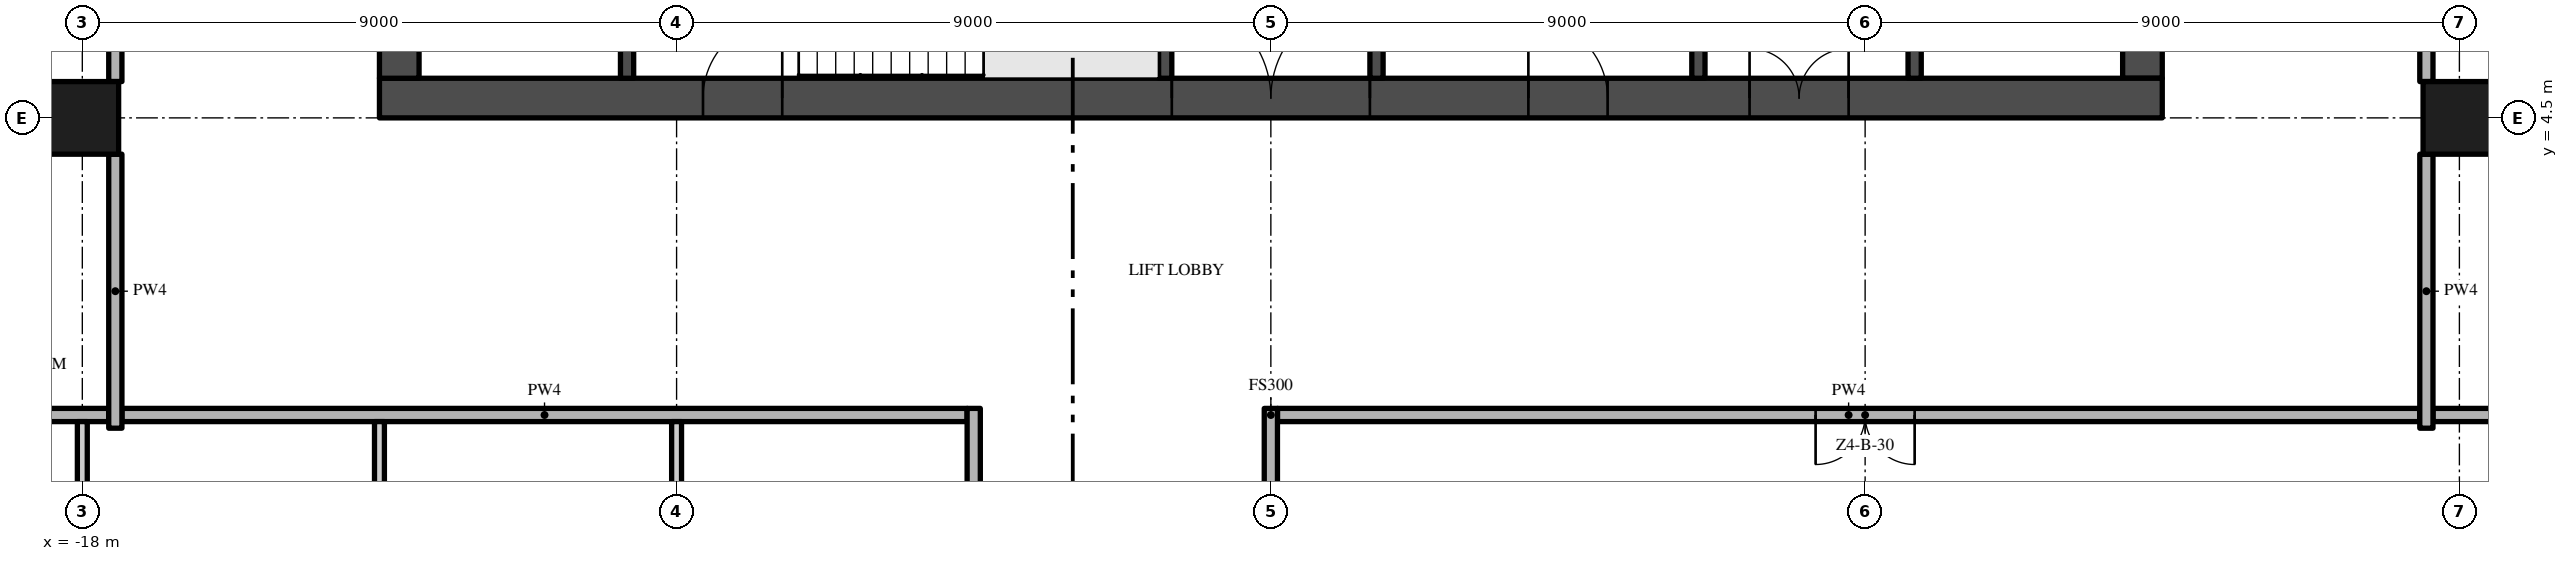
"""IFC4 building model, lengths in metres.
Left out: names, types, materials, properties, quantities, classifications, styles, units other than length and angle.
Written with IfcOpenShell. Run it as: python <this file> out.ifc"""

import sys

from ifc_helpers import new_model, si_unit, direction, frame, frame_2d, origin, origin_2d, place, context, subcontext, project, spatial, rectangle, extrude, element, fill, save


model = new_model("IFC4")
c1 = context("Model", 3, precision=1e-05, world=origin(), true_north=direction((0.0, 1.0)))
c2 = subcontext(c1, "Body", "Model", "MODEL_VIEW")
j1 = project(units=[si_unit("LENGTHUNIT", "METRE"), si_unit("PLANEANGLEUNIT", "RADIAN")], contexts=[c1])
p1 = place(None, origin())
s1 = spatial("IfcSite", under=j1, at=p1, CompositionType="ELEMENT")
p2 = place(p1, origin())
s2 = spatial("IfcBuilding", under=s1, at=p2, CompositionType="ELEMENT")
p3 = place(p2, frame((0.0, 0.0, 199.6)))
s3 = spatial("IfcBuildingStorey", under=s2, at=p3, CompositionType="ELEMENT", Elevation=199.6)
p4 = place(p3, frame((-13.5, 4.8, -0.3), z_axis=(0.0, 0.0, 1.0), x_axis=(1.0, 0.0, 0.0)))
e1 = element("IfcWall", 1, at=p4, inside=s3, PredefinedType="SHEAR", context=c2, shape_type="SweptSolid", body=[
    extrude(rectangle(XDim=27.0, YDim=0.6, at=frame_2d((13.5, 0.0))), origin(), (0.0, 0.0, 1.0), 3.8),
])
p5 = place(p4, frame((12.0, 0.0, 0.3)))
e2 = element("IfcOpeningElement", 2, at=p5, cuts=e1, PredefinedType="OPENING", context=c2, shape_type="SweptSolid", body=[
    extrude(rectangle(XDim=3.0, YDim=2.4, at=frame_2d((1.5, 1.2))), frame((0.0, 0.31, 0.0), z_axis=(0.0, -1.0, 0.0), x_axis=(1.0, 0.0, 0.0)), (0.0, 0.0, 1.0), 0.62),
])
p6 = place(p4, frame((4.9, 0.0, 0.3)))
e3 = element("IfcOpeningElement", 3, at=p6, cuts=e1, PredefinedType="OPENING", context=c2, shape_type="SweptSolid", body=[
    extrude(rectangle(XDim=1.2, YDim=2.2, at=frame_2d((0.6, 1.1))), frame((0.0, 0.31, 0.0), z_axis=(0.0, -1.0, 0.0), x_axis=(1.0, 0.0, 0.0)), (0.0, 0.0, 1.0), 0.62),
])
p7 = place(p4, frame((20.75, 0.0, 0.3)))
e4 = element("IfcOpeningElement", 4, at=p7, cuts=e1, PredefinedType="OPENING", context=c2, shape_type="SweptSolid", body=[
    extrude(rectangle(XDim=1.5, YDim=2.2, at=frame_2d((0.75, 1.1))), frame((0.0, 0.31, 0.0), z_axis=(0.0, -1.0, 0.0), x_axis=(1.0, 0.0, 0.0)), (0.0, 0.0, 1.0), 0.62),
])
p8 = place(p4, frame((17.4, 0.0, 0.3)))
e5 = element("IfcOpeningElement", 5, at=p8, cuts=e1, PredefinedType="OPENING", context=c2, shape_type="SweptSolid", body=[
    extrude(rectangle(XDim=1.2, YDim=2.2, at=frame_2d((0.6, 1.1))), frame((0.0, 0.31, 0.0), z_axis=(0.0, -1.0, 0.0), x_axis=(1.0, 0.0, 0.0)), (0.0, 0.0, 1.0), 0.62),
])
p9 = place(p3, frame((13.2, 5.1, -0.3), z_axis=(0.0, 0.0, 1.0), x_axis=(0.0, 1.0, 0.0)))
e6 = element("IfcWall", 6, at=p9, inside=s3, PredefinedType="SHEAR", context=c2, shape_type="SweptSolid", body=[
    extrude(rectangle(XDim=16.8, YDim=0.6, at=frame_2d((8.4, 0.0))), origin(), (0.0, 0.0, 1.0), 3.8),
])
p10 = place(p9, frame((6.3, 0.0, 0.3)))
e7 = element("IfcOpeningElement", 7, at=p10, cuts=e6, PredefinedType="OPENING", context=c2, shape_type="SweptSolid", body=[
    extrude(rectangle(XDim=1.2, YDim=2.2, at=frame_2d((0.6, 1.1))), frame((0.0, 0.31, 0.0), z_axis=(0.0, -1.0, 0.0), x_axis=(1.0, 0.0, 0.0)), (0.0, 0.0, 1.0), 0.62),
])
p11 = place(p3, frame((-13.2, 21.9, -0.3), z_axis=(0.0, 0.0, 1.0), x_axis=(0.0, -1.0, 0.0)))
e8 = element("IfcWall", 8, at=p11, inside=s3, PredefinedType="SHEAR", context=c2, shape_type="SweptSolid", body=[
    extrude(rectangle(XDim=16.8, YDim=0.6, at=frame_2d((8.4, 0.0))), origin(), (0.0, 0.0, 1.0), 3.8),
])
p12 = place(p11, frame((9.3, 0.0, 0.3)))
e9 = element("IfcOpeningElement", 9, at=p12, cuts=e8, PredefinedType="OPENING", context=c2, shape_type="SweptSolid", body=[
    extrude(rectangle(XDim=1.2, YDim=2.2, at=frame_2d((0.6, 1.1))), frame((0.0, 0.31, 0.0), z_axis=(0.0, -1.0, 0.0), x_axis=(1.0, 0.0, 0.0)), (0.0, 0.0, 1.0), 0.62),
])
for number, where, z_axis, x_axis in (
    (10, (-18.0, 4.5, 0.0), (0.0, 0.0, 1.0), (1.0, 0.0, 0.0)),
    (11, (18.0, 4.5, 0.0), (0.0, 0.0, 1.0), (1.0, 0.0, 0.0)),
):
    element("IfcColumn", number, at=place(p3, frame(where, z_axis=z_axis, x_axis=x_axis)), inside=s3, PredefinedType="COLUMN", context=c2, shape_type="SweptSolid", body=[
        extrude(rectangle(XDim=1.1, YDim=1.1, at=origin_2d()), origin(), (0.0, 0.0, 1.0), 3.5),
    ])
for number, where, z_axis, x_axis in (
    (12, (-9.75, 5.1, 0.0), (0.0, 0.0, 1.0), (0.0, 1.0, 0.0)),
    (13, (-1.6, 5.1, 0.0), (0.0, 0.0, 1.0), (0.0, 1.0, 0.0)),
):
    element("IfcWall", number, at=place(p3, frame(where, z_axis=z_axis, x_axis=x_axis)), inside=s3, PredefinedType="SHEAR", context=c2, shape_type="SweptSolid", body=[
        extrude(rectangle(XDim=2.85, YDim=0.2, at=frame_2d((1.425, 0.0))), origin(), (0.0, 0.0, 1.0), 3.5),
    ])
p13 = place(p3, frame((1.6, 11.5, 0.0), z_axis=(0.0, 0.0, 1.0), x_axis=(0.0, -1.0, 0.0)))
e14 = element("IfcWall", 14, at=p13, inside=s3, PredefinedType="SHEAR", context=c2, shape_type="SweptSolid", body=[
    extrude(rectangle(XDim=6.4, YDim=0.2, at=frame_2d((3.2, 0.0))), origin(), (0.0, 0.0, 1.0), 3.5),
])
p14 = place(p13, frame((2.35, 0.0, 0.0)))
e15 = element("IfcOpeningElement", 15, at=p14, cuts=e14, PredefinedType="OPENING", context=c2, shape_type="SweptSolid", body=[
    extrude(rectangle(XDim=0.9, YDim=2.1, at=frame_2d((0.45, 1.05))), frame((0.0, 0.11, 0.0), z_axis=(0.0, -1.0, 0.0), x_axis=(1.0, 0.0, 0.0)), (0.0, 0.0, 1.0), 0.22),
])
p15 = place(p3, frame((6.475, 5.1, 0.0), z_axis=(0.0, 0.0, 1.0), x_axis=(0.0, 1.0, 0.0)))
e16 = element("IfcWall", 16, at=p15, inside=s3, PredefinedType="SHEAR", context=c2, shape_type="SweptSolid", body=[
    extrude(rectangle(XDim=6.4, YDim=0.2, at=frame_2d((3.2, 0.0))), origin(), (0.0, 0.0, 1.0), 3.5),
])
p16 = place(p3, frame((9.75, 5.1, 0.0), z_axis=(0.0, 0.0, 1.0), x_axis=(0.0, 1.0, 0.0)))
e17 = element("IfcWall", 17, at=p16, inside=s3, PredefinedType="SHEAR", context=c2, shape_type="SweptSolid", body=[
    extrude(rectangle(XDim=2.5, YDim=0.2, at=frame_2d((1.25, 0.0))), origin(), (0.0, 0.0, 1.0), 3.5),
])
p17 = place(p16, frame((0.85, 0.0, 0.0)))
e18 = element("IfcOpeningElement", 18, at=p17, cuts=e17, PredefinedType="OPENING", context=c2, shape_type="SweptSolid", body=[
    extrude(rectangle(XDim=1.1, YDim=2.1, at=frame_2d((0.55, 1.05))), frame((0.0, 0.11, 0.0), z_axis=(0.0, -1.0, 0.0), x_axis=(1.0, 0.0, 0.0)), (0.0, 0.0, 1.0), 0.22),
])
p18 = place(p3, frame((-17.4, 0.0, 0.0), z_axis=(0.0, 0.0, 1.0), x_axis=(1.0, 0.0, 0.0)))
e19 = element("IfcWall", 19, at=p18, inside=s3, PredefinedType="PARTITIONING", context=c2, shape_type="SweptSolid", body=[
    extrude(rectangle(XDim=12.8, YDim=0.2, at=frame_2d((6.4, 0.0))), origin(), (0.0, 0.0, 1.0), 3.5),
])
p19 = place(p3, frame((17.4, 0.0, 0.0), z_axis=(0.0, 0.0, 1.0), x_axis=(-1.0, 0.0, 0.0)))
e20 = element("IfcWall", 20, at=p19, inside=s3, PredefinedType="PARTITIONING", context=c2, shape_type="SweptSolid", body=[
    extrude(rectangle(XDim=17.3, YDim=0.2, at=frame_2d((8.65, 0.0))), origin(), (0.0, 0.0, 1.0), 3.5),
])
p20 = place(p19, frame((7.65, 0.0, 0.0)))
e21 = element("IfcOpeningElement", 21, at=p20, cuts=e20, PredefinedType="OPENING", context=c2, shape_type="SweptSolid", body=[
    extrude(rectangle(XDim=1.5, YDim=2.4, at=frame_2d((0.75, 1.2))), frame((0.0, 0.11, 0.0), z_axis=(0.0, -1.0, 0.0), x_axis=(1.0, 0.0, 0.0)), (0.0, 0.0, 1.0), 0.22),
])
for number, where, z_axis, x_axis in (
    (22, (-26.7, 0.0, 0.0), (0.0, 0.0, 1.0), (1.0, 0.0, 0.0)),
    (23, (17.6, 0.0, 0.0), (0.0, 0.0, 1.0), (1.0, 0.0, 0.0)),
):
    element("IfcWall", number, at=place(p3, frame(where, z_axis=z_axis, x_axis=x_axis)), inside=s3, PredefinedType="PARTITIONING", context=c2, shape_type="SweptSolid", body=[
        extrude(rectangle(XDim=9.1, YDim=0.2, at=frame_2d((4.55, 0.0))), origin(), (0.0, 0.0, 1.0), 3.5),
    ])
p21 = place(p3, frame((-18.0, -3.95, 0.0), z_axis=(0.0, 0.0, 1.0), x_axis=(0.0, 1.0, 0.0)))
e24 = element("IfcWall", 24, at=p21, inside=s3, PredefinedType="PARTITIONING", context=c2, shape_type="SweptSolid", body=[
    extrude(rectangle(XDim=3.85, YDim=0.15, at=frame_2d((1.925, 0.0))), origin(), (0.0, 0.0, 1.0), 3.5),
])
p22 = place(p21, frame((0.15, 0.0, 0.0)))
e25 = element("IfcOpeningElement", 25, at=p22, cuts=e24, PredefinedType="OPENING", context=c2, shape_type="SweptSolid", body=[
    extrude(rectangle(XDim=1.0, YDim=2.4, at=frame_2d((0.5, 1.2))), frame((0.0, 0.085, 0.0), z_axis=(0.0, -1.0, 0.0), x_axis=(1.0, 0.0, 0.0)), (0.0, 0.0, 1.0), 0.17),
])
p23 = place(p3, frame((-17.5, -0.2, 0.0), z_axis=(0.0, 0.0, 1.0), x_axis=(0.0, 1.0, 0.0)))
e26 = element("IfcWall", 26, at=p23, inside=s3, PredefinedType="PARTITIONING", context=c2, shape_type="SweptSolid", body=[
    extrude(rectangle(XDim=4.15, YDim=0.2, at=frame_2d((2.075, 0.0))), origin(), (0.0, 0.0, 1.0), 3.5),
])
p24 = place(p3, frame((-17.5, 5.05, 0.0), z_axis=(0.0, 0.0, 1.0), x_axis=(0.0, 1.0, 0.0)))
e27 = element("IfcWall", 27, at=p24, inside=s3, PredefinedType="PARTITIONING", context=c2, shape_type="SweptSolid", body=[
    extrude(rectangle(XDim=7.9, YDim=0.2, at=frame_2d((3.95, 0.0))), origin(), (0.0, 0.0, 1.0), 3.5),
])
p25 = place(p24, frame((3.35, 0.0, 0.0)))
e28 = element("IfcOpeningElement", 28, at=p25, cuts=e27, PredefinedType="OPENING", context=c2, shape_type="SweptSolid", body=[
    extrude(rectangle(XDim=1.2, YDim=2.4, at=frame_2d((0.6, 1.2))), frame((0.0, 0.11, 0.0), z_axis=(0.0, -1.0, 0.0), x_axis=(1.0, 0.0, 0.0)), (0.0, 0.0, 1.0), 0.22),
])
p26 = place(p3, frame((-13.5, -8.325, 0.0), z_axis=(0.0, 0.0, 1.0), x_axis=(0.0, 1.0, 0.0)))
e29 = element("IfcWall", 29, at=p26, inside=s3, PredefinedType="PARTITIONING", context=c2, shape_type="SweptSolid", body=[
    extrude(rectangle(XDim=8.225, YDim=0.15, at=frame_2d((4.112, 0.0))), origin(), (0.0, 0.0, 1.0), 3.5),
])
p27 = place(p3, frame((-9.0, -3.95, 0.0), z_axis=(0.0, 0.0, 1.0), x_axis=(0.0, 1.0, 0.0)))
e30 = element("IfcWall", 30, at=p27, inside=s3, PredefinedType="PARTITIONING", context=c2, shape_type="SweptSolid", body=[
    extrude(rectangle(XDim=3.85, YDim=0.15, at=frame_2d((1.925, 0.0))), origin(), (0.0, 0.0, 1.0), 3.5),
])
p28 = place(p27, frame((0.45, 0.0, 0.0)))
e31 = element("IfcOpeningElement", 31, at=p28, cuts=e30, PredefinedType="OPENING", context=c2, shape_type="SweptSolid", body=[
    extrude(rectangle(XDim=1.0, YDim=2.4, at=frame_2d((0.5, 1.2))), frame((0.0, 0.085, 0.0), z_axis=(0.0, -1.0, 0.0), x_axis=(1.0, 0.0, 0.0)), (0.0, 0.0, 1.0), 0.17),
])
p29 = place(p3, frame((-4.5, -22.2, 0.0), z_axis=(0.0, 0.0, 1.0), x_axis=(0.0, 1.0, 0.0)))
e32 = element("IfcWall", 32, at=p29, inside=s3, PredefinedType="PARTITIONING", context=c2, shape_type="SweptSolid", body=[
    extrude(rectangle(XDim=22.3, YDim=0.2, at=frame_2d((11.15, 0.0))), origin(), (0.0, 0.0, 1.0), 3.5),
])
p30 = place(p29, frame((10.2, 0.0, 0.0)))
e33 = element("IfcOpeningElement", 33, at=p30, cuts=e32, PredefinedType="OPENING", context=c2, shape_type="SweptSolid", body=[
    extrude(rectangle(XDim=1.5, YDim=2.4, at=frame_2d((0.75, 1.2))), frame((0.0, 0.11, 0.0), z_axis=(0.0, -1.0, 0.0), x_axis=(1.0, 0.0, 0.0)), (0.0, 0.0, 1.0), 0.22),
])
p31 = place(p3, frame((0.0, -3.95, 0.0), z_axis=(0.0, 0.0, 1.0), x_axis=(0.0, 1.0, 0.0)))
e34 = element("IfcWall", 34, at=p31, inside=s3, PredefinedType="PARTITIONING", context=c2, shape_type="SweptSolid", body=[
    extrude(rectangle(XDim=4.05, YDim=0.2, at=frame_2d((2.025, 0.0))), origin(), (0.0, 0.0, 1.0), 3.5),
])
p32 = place(p3, frame((17.5, -0.2, 0.0), z_axis=(0.0, 0.0, 1.0), x_axis=(0.0, 1.0, 0.0)))
e35 = element("IfcWall", 35, at=p32, inside=s3, PredefinedType="PARTITIONING", context=c2, shape_type="SweptSolid", body=[
    extrude(rectangle(XDim=4.15, YDim=0.2, at=frame_2d((2.075, 0.0))), origin(), (0.0, 0.0, 1.0), 3.5),
])
p33 = place(p3, frame((17.5, 12.95, 0.0), z_axis=(0.0, 0.0, 1.0), x_axis=(0.0, -1.0, 0.0)))
e36 = element("IfcWall", 36, at=p33, inside=s3, PredefinedType="PARTITIONING", context=c2, shape_type="SweptSolid", body=[
    extrude(rectangle(XDim=7.9, YDim=0.2, at=frame_2d((3.95, 0.0))), origin(), (0.0, 0.0, 1.0), 3.5),
])
p34 = place(p33, frame((5.6, 0.0, 0.0)))
e37 = element("IfcOpeningElement", 37, at=p34, cuts=e36, PredefinedType="OPENING", context=c2, shape_type="SweptSolid", body=[
    extrude(rectangle(XDim=1.2, YDim=2.4, at=frame_2d((0.6, 1.2))), frame((0.0, 0.11, 0.0), z_axis=(0.0, -1.0, 0.0), x_axis=(1.0, 0.0, 0.0)), (0.0, 0.0, 1.0), 0.22),
])
p35 = place(p5, frame((3.0, 0.0, 0.0), z_axis=(0.0, 0.0, 1.0), x_axis=(-1.0, 0.0, 0.0)))
e38 = element("IfcDoor", 38, at=p35, inside=s3, OperationType="DOUBLE_DOOR_SINGLE_SWING", PredefinedType="DOOR", context=c2, shape_type="SweptSolid", body=[
    extrude(rectangle(XDim=3.0, YDim=2.4, at=frame_2d((1.5, 1.2))), frame((0.0, 0.025, 0.0), z_axis=(0.0, -1.0, 0.0), x_axis=(1.0, 0.0, 0.0)), (0.0, 0.0, 1.0), 0.05),
])
fill(e2, e38)
p36 = place(p6, frame((1.2, 0.0, 0.0), z_axis=(0.0, 0.0, 1.0), x_axis=(-1.0, 0.0, 0.0)))
e39 = element("IfcDoor", 39, at=p36, inside=s3, OperationType="SINGLE_SWING_LEFT", PredefinedType="DOOR", context=c2, shape_type="SweptSolid", body=[
    extrude(rectangle(XDim=1.2, YDim=2.2, at=frame_2d((0.6, 1.1))), frame((0.0, 0.025, 0.0), z_axis=(0.0, -1.0, 0.0), x_axis=(1.0, 0.0, 0.0)), (0.0, 0.0, 1.0), 0.05),
])
fill(e3, e39)
p37 = place(p7, frame((1.5, 0.0, 0.0), z_axis=(0.0, 0.0, 1.0), x_axis=(-1.0, 0.0, 0.0)))
e40 = element("IfcDoor", 40, at=p37, inside=s3, OperationType="DOUBLE_DOOR_SINGLE_SWING", PredefinedType="DOOR", context=c2, shape_type="SweptSolid", body=[
    extrude(rectangle(XDim=1.5, YDim=2.2, at=frame_2d((0.75, 1.1))), frame((0.0, 0.025, 0.0), z_axis=(0.0, -1.0, 0.0), x_axis=(1.0, 0.0, 0.0)), (0.0, 0.0, 1.0), 0.05),
])
fill(e4, e40)
p38 = place(p8, frame((1.2, 0.0, 0.0), z_axis=(0.0, 0.0, 1.0), x_axis=(-1.0, 0.0, 0.0)))
e41 = element("IfcDoor", 41, at=p38, inside=s3, OperationType="SINGLE_SWING_RIGHT", PredefinedType="DOOR", context=c2, shape_type="SweptSolid", body=[
    extrude(rectangle(XDim=1.2, YDim=2.2, at=frame_2d((0.6, 1.1))), frame((0.0, 0.025, 0.0), z_axis=(0.0, -1.0, 0.0), x_axis=(1.0, 0.0, 0.0)), (0.0, 0.0, 1.0), 0.05),
])
fill(e5, e41)
p39 = place(p20, origin())
e42 = element("IfcDoor", 42, at=p39, inside=s3, OperationType="DOUBLE_DOOR_SINGLE_SWING", PredefinedType="DOOR", context=c2, shape_type="SweptSolid", body=[
    extrude(rectangle(XDim=1.5, YDim=2.4, at=frame_2d((0.75, 1.2))), frame((0.0, 0.025, 0.0), z_axis=(0.0, -1.0, 0.0), x_axis=(1.0, 0.0, 0.0)), (0.0, 0.0, 1.0), 0.05),
])
fill(e21, e42)
save(model, sys.argv[1])
